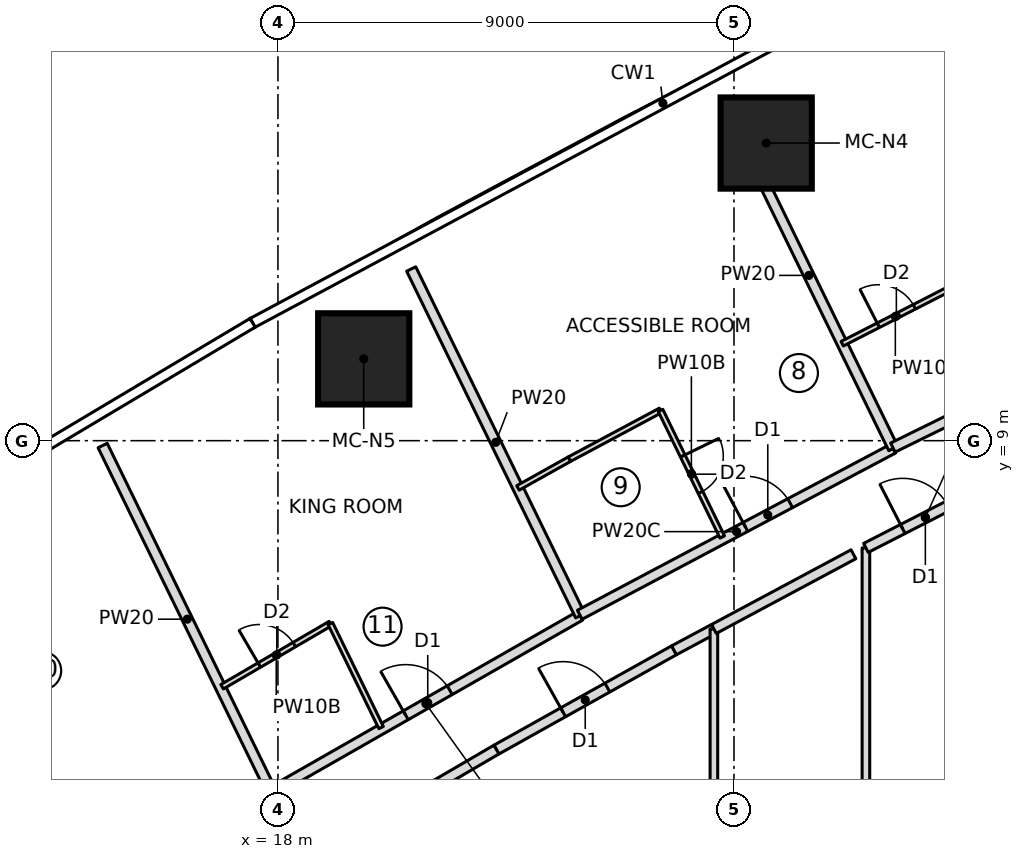
"""IFC4 building model, lengths in metres.
Left out: names, types, materials, properties, quantities, classifications, styles, units other than length and angle.
Written with IfcOpenShell. Run it as: python <this file> out.ifc"""

import sys

from ifc_helpers import new_model, si_unit, direction, frame, frame_2d, origin, origin_2d, place, context, subcontext, project, spatial, rectangle, extrude, element, fill, save


model = new_model("IFC4")
c1 = context("Model", 3, precision=1e-05, world=origin(), true_north=direction((0.0, 1.0)))
c2 = subcontext(c1, "Body", "Model", "MODEL_VIEW")
j1 = project(units=[si_unit("LENGTHUNIT", "METRE"), si_unit("PLANEANGLEUNIT", "RADIAN")], contexts=[c1])
p1 = place(None, origin())
s1 = spatial("IfcSite", under=j1, at=p1, CompositionType="ELEMENT")
p2 = place(p1, origin())
s2 = spatial("IfcBuilding", under=s1, at=p2, CompositionType="ELEMENT")
p3 = place(p2, frame((0.0, 0.0, 68.0)))
s3 = spatial("IfcBuildingStorey", under=s2, at=p3, CompositionType="ELEMENT", Elevation=68.0)
for number, where, z_axis, x_axis in (
    (1, (27.635, 14.874, 0.0), (0.0, 0.0, 1.0), (1.0, 0.0, 0.0)),
    (2, (19.693, 10.615, 0.0), (0.0, 0.0, 1.0), (1.0, 0.0, 0.0)),
):
    element("IfcColumn", number, at=place(p3, frame(where, z_axis=z_axis, x_axis=x_axis)), inside=s3, PredefinedType="COLUMN", context=c2, shape_type="SweptSolid", body=[
        extrude(rectangle(XDim=1.8, YDim=1.8, at=origin_2d()), origin(), (0.0, 0.0, 1.0), 3.55),
    ])
p4 = place(p3, frame((17.882, 2.05, 0.0), z_axis=(0.0, 0.0, 1.0), x_axis=(-0.438213564788, 0.898870887078, 0.0)))
e3 = element("IfcWall", 3, at=p4, inside=s3, PredefinedType="PARTITIONING", context=c2, shape_type="SweptSolid", body=[
    extrude(rectangle(XDim=7.625, YDim=0.2, at=frame_2d((3.813, 0.0))), origin(), (0.0, 0.0, 1.0), 3.25),
])
p5 = place(p3, frame((17.874, 2.068, 0.0), z_axis=(0.0, 0.0, 1.0), x_axis=(0.868427275315, 0.495816566373, 0.0)))
e4 = element("IfcWall", 4, at=p5, inside=s3, PredefinedType="PARTITIONING", context=c2, shape_type="SweptSolid", body=[
    extrude(rectangle(XDim=7.015, YDim=0.2, at=frame_2d((3.507, 0.0))), origin(), (0.0, 0.0, 1.0), 3.25),
])
p6 = place(p5, frame((3.05, 0.0, 0.0)))
e5 = element("IfcOpeningElement", 5, at=p6, cuts=e4, PredefinedType="OPENING", context=c2, shape_type="SweptSolid", body=[
    extrude(rectangle(XDim=1.0, YDim=2.1, at=frame_2d((0.5, 1.05))), frame((0.0, 0.11, 0.0), z_axis=(0.0, -1.0, 0.0), x_axis=(1.0, 0.0, 0.0)), (0.0, 0.0, 1.0), 0.22),
])
p7 = place(p3, frame((16.898, 4.144, 0.0), z_axis=(0.0, 0.0, 1.0), x_axis=(0.863707305865, 0.503993739837, 0.0)))
e6 = element("IfcWall", 6, at=p7, inside=s3, PredefinedType="PARTITIONING", context=c2, shape_type="SweptSolid", body=[
    extrude(rectangle(XDim=2.474, YDim=0.1, at=frame_2d((1.237, 0.0))), origin(), (0.0, 0.0, 1.0), 3.25),
])
p8 = place(p7, frame((0.85, 0.0, 0.0)))
e7 = element("IfcOpeningElement", 7, at=p8, cuts=e6, PredefinedType="OPENING", context=c2, shape_type="SweptSolid", body=[
    extrude(rectangle(XDim=0.8, YDim=2.1, at=frame_2d((0.4, 1.05))), frame((0.0, 0.06, 0.0), z_axis=(0.0, -1.0, 0.0), x_axis=(1.0, 0.0, 0.0)), (0.0, 0.0, 1.0), 0.12),
])
p9 = place(p3, frame((19.035, 5.39, 0.0), z_axis=(0.0, 0.0, 1.0), x_axis=(0.438122322582, -0.898915363344, 0.0)))
e8 = element("IfcWall", 8, at=p9, inside=s3, PredefinedType="PARTITIONING", context=c2, shape_type="SweptSolid", body=[
    extrude(rectangle(XDim=2.283, YDim=0.1, at=frame_2d((1.142, 0.0))), origin(), (0.0, 0.0, 1.0), 3.25),
])
p10 = place(p3, frame((23.965, 5.546, 0.0), z_axis=(0.0, 0.0, 1.0), x_axis=(-0.438184754816, 0.898884931816, 0.0)))
e9 = element("IfcWall", 9, at=p10, inside=s3, PredefinedType="PARTITIONING", context=c2, shape_type="SweptSolid", body=[
    extrude(rectangle(XDim=7.612, YDim=0.2, at=frame_2d((3.806, 0.0))), origin(), (0.0, 0.0, 1.0), 3.25),
])
p11 = place(p3, frame((23.957, 5.564, 0.0), z_axis=(0.0, 0.0, 1.0), x_axis=(0.883455325405, 0.468515408513, 0.0)))
e10 = element("IfcWall", 10, at=p11, inside=s3, PredefinedType="PARTITIONING", context=c2, shape_type="SweptSolid", body=[
    extrude(rectangle(XDim=7.004, YDim=0.2, at=frame_2d((3.502, 0.0))), origin(), (0.0, 0.0, 1.0), 3.25),
])
p12 = place(p11, frame((3.7, 0.0, 0.0)))
e11 = element("IfcOpeningElement", 11, at=p12, cuts=e10, PredefinedType="OPENING", context=c2, shape_type="SweptSolid", body=[
    extrude(rectangle(XDim=1.0, YDim=2.1, at=frame_2d((0.5, 1.05))), frame((0.0, 0.11, 0.0), z_axis=(0.0, -1.0, 0.0), x_axis=(1.0, 0.0, 0.0)), (0.0, 0.0, 1.0), 0.22),
])
p13 = place(p3, frame((22.737, 8.067, 0.0), z_axis=(0.0, 0.0, 1.0), x_axis=(0.872799020153, 0.488079778745, 0.0)))
e12 = element("IfcWall", 12, at=p13, inside=s3, PredefinedType="PARTITIONING", context=c2, shape_type="SweptSolid", body=[
    extrude(rectangle(XDim=1.165, YDim=0.1, at=frame_2d((0.582, 0.0))), origin(), (0.0, 0.0, 1.0), 3.25),
])
p14 = place(p3, frame((23.753, 8.635, 0.0), z_axis=(0.0, 0.0, 1.0), x_axis=(0.881675736231, 0.471855800156, 0.0)))
e13 = element("IfcWall", 13, at=p14, inside=s3, PredefinedType="PARTITIONING", context=c2, shape_type="SweptSolid", body=[
    extrude(rectangle(XDim=2.039, YDim=0.1, at=frame_2d((1.019, 0.0))), origin(), (0.0, 0.0, 1.0), 3.25),
])
p15 = place(p3, frame((25.55, 9.597, 0.0), z_axis=(0.0, 0.0, 1.0), x_axis=(0.43822975423, -0.898862994292, 0.0)))
e14 = element("IfcWall", 14, at=p15, inside=s3, PredefinedType="PARTITIONING", context=c2, shape_type="SweptSolid", body=[
    extrude(rectangle(XDim=2.779, YDim=0.1, at=frame_2d((1.389, 0.0))), origin(), (0.0, 0.0, 1.0), 3.25),
])
p16 = place(p15, frame((1.0, 0.0, 0.0)))
e15 = element("IfcOpeningElement", 15, at=p16, cuts=e14, PredefinedType="OPENING", context=c2, shape_type="SweptSolid", body=[
    extrude(rectangle(XDim=0.8, YDim=2.1, at=frame_2d((0.4, 1.05))), frame((0.0, 0.06, 0.0), z_axis=(0.0, -1.0, 0.0), x_axis=(1.0, 0.0, 0.0)), (0.0, 0.0, 1.0), 0.12),
])
p17 = place(p3, frame((30.144, 8.846, 0.0), z_axis=(0.0, 0.0, 1.0), x_axis=(-0.438185054829, 0.898884785567, 0.0)))
e16 = element("IfcWall", 16, at=p17, inside=s3, PredefinedType="PARTITIONING", context=c2, shape_type="SweptSolid", body=[
    extrude(rectangle(XDim=7.601, YDim=0.2, at=frame_2d((3.801, 0.0))), origin(), (0.0, 0.0, 1.0), 3.25),
])
p18 = place(p3, frame((30.135, 8.864, 0.0), z_axis=(0.0, 0.0, 1.0), x_axis=(0.897599118183, 0.44081268475, 0.0)))
e17 = element("IfcWall", 17, at=p18, inside=s3, PredefinedType="PARTITIONING", context=c2, shape_type="SweptSolid", body=[
    extrude(rectangle(XDim=7.0, YDim=0.2, at=frame_2d((3.5, 0.0))), origin(), (0.0, 0.0, 1.0), 3.25),
])
p19 = place(p18, frame((4.25, 0.0, 0.0)))
e18 = element("IfcOpeningElement", 18, at=p19, cuts=e17, PredefinedType="OPENING", context=c2, shape_type="SweptSolid", body=[
    extrude(rectangle(XDim=1.0, YDim=2.1, at=frame_2d((0.5, 1.05))), frame((0.0, 0.11, 0.0), z_axis=(0.0, -1.0, 0.0), x_axis=(1.0, 0.0, 0.0)), (0.0, 0.0, 1.0), 0.22),
])
p20 = place(p3, frame((29.136, 10.914, 0.0), z_axis=(0.0, 0.0, 1.0), x_axis=(0.890219804082, 0.45553122881, 0.0)))
e19 = element("IfcWall", 19, at=p20, inside=s3, PredefinedType="PARTITIONING", context=c2, shape_type="SweptSolid", body=[
    extrude(rectangle(XDim=2.354, YDim=0.1, at=frame_2d((1.177, 0.0))), origin(), (0.0, 0.0, 1.0), 3.25),
])
p21 = place(p20, frame((0.8, 0.0, 0.0)))
e20 = element("IfcOpeningElement", 20, at=p21, cuts=e19, PredefinedType="OPENING", context=c2, shape_type="SweptSolid", body=[
    extrude(rectangle(XDim=0.8, YDim=2.1, at=frame_2d((0.4, 1.05))), frame((0.0, 0.06, 0.0), z_axis=(0.0, -1.0, 0.0), x_axis=(1.0, 0.0, 0.0)), (0.0, 0.0, 1.0), 0.12),
])
p22 = place(p3, frame((22.312, 2.903, 0.0), z_axis=(0.0, 0.0, 1.0), x_axis=(0.872800289292, 0.488077509225, 0.0)))
e21 = element("IfcWall", 21, at=p22, inside=s3, PredefinedType="PARTITIONING", context=c2, shape_type="SweptSolid", body=[
    extrude(rectangle(XDim=4.016, YDim=0.2, at=frame_2d((2.008, 0.0))), origin(), (0.0, 0.0, 1.0), 3.25),
])
p23 = place(p22, frame((1.508, 0.0, 0.0)))
e22 = element("IfcOpeningElement", 22, at=p23, cuts=e21, PredefinedType="OPENING", context=c2, shape_type="SweptSolid", body=[
    extrude(rectangle(XDim=1.0, YDim=2.1, at=frame_2d((0.5, 1.05))), frame((0.0, 0.11, 0.0), z_axis=(0.0, -1.0, 0.0), x_axis=(1.0, 0.0, 0.0)), (0.0, 0.0, 1.0), 0.22),
])
p24 = place(p3, frame((18.844, 0.879, 0.0), z_axis=(0.0, 0.0, 1.0), x_axis=(0.863710538269, 0.503988200341, 0.0)))
e23 = element("IfcWall", 23, at=p24, inside=s3, PredefinedType="PARTITIONING", context=c2, shape_type="SweptSolid", body=[
    extrude(rectangle(XDim=4.016, YDim=0.2, at=frame_2d((2.008, 0.0))), origin(), (0.0, 0.0, 1.0), 3.25),
])
p25 = place(p3, frame((25.817, 4.863, 0.0), z_axis=(0.0, 0.0, 1.0), x_axis=(0.881715816073, 0.471780902207, 0.0)))
e24 = element("IfcWall", 24, at=p25, inside=s3, PredefinedType="PARTITIONING", context=c2, shape_type="SweptSolid", body=[
    extrude(rectangle(XDim=0.892, YDim=0.2, at=frame_2d((0.446, 0.0))), origin(), (0.0, 0.0, 1.0), 3.25),
])
p26 = place(p3, frame((26.604, -5.284, 0.0), z_axis=(0.0, 0.0, 1.0), x_axis=(0.0, 1.0, 0.0)))
e25 = element("IfcWall", 25, at=p26, inside=s3, PredefinedType="PARTITIONING", context=c2, shape_type="SweptSolid", body=[
    extrude(rectangle(XDim=10.568, YDim=0.15, at=frame_2d((5.284, 0.0))), origin(), (0.0, 0.0, 1.0), 3.25),
])
p27 = place(p3, frame((26.604, 5.284, 0.0), z_axis=(0.0, 0.0, 1.0), x_axis=(0.881637943627, 0.471926409895, 0.0)))
e26 = element("IfcWall", 26, at=p27, inside=s3, PredefinedType="PARTITIONING", context=c2, shape_type="SweptSolid", body=[
    extrude(rectangle(XDim=3.124, YDim=0.2, at=frame_2d((1.562, 0.0))), origin(), (0.0, 0.0, 1.0), 3.25),
])
p28 = place(p3, frame((29.604, -6.884, 0.0), z_axis=(0.0, 0.0, 1.0), x_axis=(0.0, 1.0, 0.0)))
e27 = element("IfcWall", 27, at=p28, inside=s3, PredefinedType="PARTITIONING", context=c2, shape_type="SweptSolid", body=[
    extrude(rectangle(XDim=13.768, YDim=0.15, at=frame_2d((6.884, 0.0))), origin(), (0.0, 0.0, 1.0), 3.25),
])
p29 = place(p3, frame((29.604, 6.884, 0.0), z_axis=(0.0, 0.0, 1.0), x_axis=(0.890220210981, 0.455530433628, 0.0)))
e28 = element("IfcWall", 28, at=p29, inside=s3, PredefinedType="PARTITIONING", context=c2, shape_type="SweptSolid", body=[
    extrude(rectangle(XDim=2.636, YDim=0.2, at=frame_2d((1.318, 0.0))), origin(), (0.0, 0.0, 1.0), 3.25),
])
p30 = place(p29, frame((0.818, 0.0, 0.0)))
e29 = element("IfcOpeningElement", 29, at=p30, cuts=e28, PredefinedType="OPENING", context=c2, shape_type="SweptSolid", body=[
    extrude(rectangle(XDim=1.0, YDim=2.1, at=frame_2d((0.5, 1.05))), frame((0.0, 0.11, 0.0), z_axis=(0.0, -1.0, 0.0), x_axis=(1.0, 0.0, 0.0)), (0.0, 0.0, 1.0), 0.22),
])
p31 = place(p8, origin())
e30 = element("IfcDoor", 30, at=p31, inside=s3, OperationType="SINGLE_SWING_LEFT", PredefinedType="DOOR", context=c2, shape_type="SweptSolid", body=[
    extrude(rectangle(XDim=0.8, YDim=2.1, at=frame_2d((0.4, 1.05))), frame((0.0, 0.025, 0.0), z_axis=(0.0, -1.0, 0.0), x_axis=(1.0, 0.0, 0.0)), (0.0, 0.0, 1.0), 0.05),
])
fill(e7, e30)
p32 = place(p6, origin())
e31 = element("IfcDoor", 31, at=p32, inside=s3, OperationType="SINGLE_SWING_LEFT", PredefinedType="DOOR", context=c2, shape_type="SweptSolid", body=[
    extrude(rectangle(XDim=1.0, YDim=2.1, at=frame_2d((0.5, 1.05))), frame((0.0, 0.025, 0.0), z_axis=(0.0, -1.0, 0.0), x_axis=(1.0, 0.0, 0.0)), (0.0, 0.0, 1.0), 0.05),
])
fill(e5, e31)
p33 = place(p16, origin())
e32 = element("IfcDoor", 32, at=p33, inside=s3, OperationType="SINGLE_SWING_LEFT", PredefinedType="DOOR", context=c2, shape_type="SweptSolid", body=[
    extrude(rectangle(XDim=0.8, YDim=2.1, at=frame_2d((0.4, 1.05))), frame((0.0, 0.025, 0.0), z_axis=(0.0, -1.0, 0.0), x_axis=(1.0, 0.0, 0.0)), (0.0, 0.0, 1.0), 0.05),
])
fill(e15, e32)
p34 = place(p12, origin())
e33 = element("IfcDoor", 33, at=p34, inside=s3, OperationType="SINGLE_SWING_LEFT", PredefinedType="DOOR", context=c2, shape_type="SweptSolid", body=[
    extrude(rectangle(XDim=1.0, YDim=2.1, at=frame_2d((0.5, 1.05))), frame((0.0, 0.025, 0.0), z_axis=(0.0, -1.0, 0.0), x_axis=(1.0, 0.0, 0.0)), (0.0, 0.0, 1.0), 0.05),
])
fill(e11, e33)
p35 = place(p21, origin())
e34 = element("IfcDoor", 34, at=p35, inside=s3, OperationType="SINGLE_SWING_LEFT", PredefinedType="DOOR", context=c2, shape_type="SweptSolid", body=[
    extrude(rectangle(XDim=0.8, YDim=2.1, at=frame_2d((0.4, 1.05))), frame((0.0, 0.025, 0.0), z_axis=(0.0, -1.0, 0.0), x_axis=(1.0, 0.0, 0.0)), (0.0, 0.0, 1.0), 0.05),
])
fill(e20, e34)
p36 = place(p23, origin())
e35 = element("IfcDoor", 35, at=p36, inside=s3, OperationType="SINGLE_SWING_LEFT", PredefinedType="DOOR", context=c2, shape_type="SweptSolid", body=[
    extrude(rectangle(XDim=1.0, YDim=2.1, at=frame_2d((0.5, 1.05))), frame((0.0, 0.025, 0.0), z_axis=(0.0, -1.0, 0.0), x_axis=(1.0, 0.0, 0.0)), (0.0, 0.0, 1.0), 0.05),
])
fill(e22, e35)
p37 = place(p30, origin())
e36 = element("IfcDoor", 36, at=p37, inside=s3, OperationType="SINGLE_SWING_LEFT", PredefinedType="DOOR", context=c2, shape_type="SweptSolid", body=[
    extrude(rectangle(XDim=1.0, YDim=2.1, at=frame_2d((0.5, 1.05))), frame((0.0, 0.025, 0.0), z_axis=(0.0, -1.0, 0.0), x_axis=(1.0, 0.0, 0.0)), (0.0, 0.0, 1.0), 0.05),
])
fill(e29, e36)
save(model, sys.argv[1])
